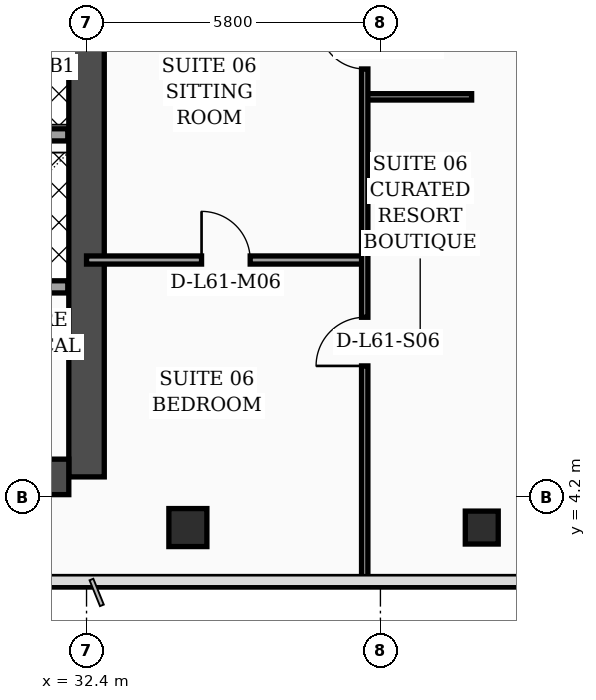
"""IFC4 building model, lengths in metres.
Left out: names, types, materials, properties, quantities, classifications, styles, units other than length and angle.
Written with IfcOpenShell. Run it as: python <this file> out.ifc"""

import sys

from ifc_helpers import new_model, si_unit, direction, frame, frame_2d, origin, origin_2d, place, context, subcontext, project, spatial, rectangle, hollow_rectangle, extrude, element, fill, save


model = new_model("IFC4")
c1 = context("Model", 3, precision=1e-05, world=origin(), true_north=direction((0.0, 1.0)))
c2 = subcontext(c1, "Body", "Model", "MODEL_VIEW")
j1 = project(units=[si_unit("LENGTHUNIT", "METRE"), si_unit("PLANEANGLEUNIT", "RADIAN")], contexts=[c1])
p1 = place(None, origin())
s1 = spatial("IfcSite", under=j1, at=p1, CompositionType="ELEMENT")
p2 = place(p1, origin())
s2 = spatial("IfcBuilding", under=s1, at=p2, CompositionType="ELEMENT")
p3 = place(p2, frame((0.0, 0.0, 247.6)))
s3 = spatial("IfcBuildingStorey", under=s2, at=p3, CompositionType="ELEMENT", Elevation=247.6)
p4 = place(p3, frame((32.4, 4.6, 0.0), z_axis=(0.0, 0.0, 1.0), x_axis=(0.0, 1.0, 0.0)))
e1 = element("IfcWall", 1, at=p4, inside=s3, PredefinedType="SHEAR", context=c2, shape_type="SweptSolid", body=[
    extrude(rectangle(XDim=10.4, YDim=0.7, at=frame_2d((5.2, 0.0))), origin(), (0.0, 0.0, 1.0), 3.56),
])
p5 = place(p3, frame((21.95, 4.6, 0.0), z_axis=(0.0, 0.0, 1.0), x_axis=(1.0, 0.0, 0.0)))
e2 = element("IfcWall", 2, at=p5, inside=s3, PredefinedType="SHEAR", context=c2, shape_type="SweptSolid", body=[
    extrude(rectangle(XDim=10.1, YDim=0.7, at=frame_2d((5.05, 0.0))), origin(), (0.0, 0.0, 1.0), 3.56),
])
p6 = place(p3, frame((34.4, 3.6, 0.0), z_axis=(0.0, 0.0, 1.0), x_axis=(1.0, 0.0, 0.0)))
e3 = element("IfcColumn", 3, at=p6, inside=s3, PredefinedType="COLUMN", context=c2, shape_type="SweptSolid", body=[
    extrude(hollow_rectangle(XDim=0.75, YDim=0.75, WallThickness=0.032, at=origin_2d()), origin(), (0.0, 0.0, 1.0), 3.56),
])
p7 = place(p3, frame((40.2, 3.6, 0.0), z_axis=(0.0, 0.0, 1.0), x_axis=(1.0, 0.0, 0.0)))
e4 = element("IfcColumn", 4, at=p7, inside=s3, PredefinedType="COLUMN", context=c2, shape_type="SweptSolid", body=[
    extrude(hollow_rectangle(XDim=0.65, YDim=0.65, WallThickness=0.028, at=origin_2d()), origin(), (0.0, 0.0, 1.0), 3.56),
])
p8 = place(p3, frame((46.63, 5.505, 0.0), z_axis=(0.0, 0.0, 1.0), x_axis=(-0.300501856448, 0.953781229775, 0.0)))
e5 = element("IfcWall", 5, at=p8, inside=s3, PredefinedType="SOLIDWALL", context=c2, shape_type="SweptSolid", body=[
    extrude(rectangle(XDim=30.814, YDim=0.32, at=frame_2d((15.407, 0.0))), origin(), (0.0, 0.0, 1.0), 3.56),
])
p9 = place(p8, frame((10.199, 0.0, 0.0)))
e6 = element("IfcOpeningElement", 6, at=p9, cuts=e5, PredefinedType="OPENING", context=c2, shape_type="SweptSolid", body=[
    extrude(rectangle(XDim=1.4, YDim=2.25, at=frame_2d((0.7, 1.125))), frame((0.0, 0.17, 0.0), z_axis=(0.0, -1.0, 0.0), x_axis=(1.0, 0.0, 0.0)), (0.0, 0.0, 1.0), 0.34),
])
p10 = place(p8, frame((4.437, 0.0, 0.7)))
e7 = element("IfcOpeningElement", 7, at=p10, cuts=e5, PredefinedType="OPENING", context=c2, shape_type="SweptSolid", body=[
    extrude(rectangle(XDim=1.6, YDim=1.65, at=frame_2d((0.8, 0.825))), frame((0.0, 0.17, 0.0), z_axis=(0.0, -1.0, 0.0), x_axis=(1.0, 0.0, 0.0)), (0.0, 0.0, 1.0), 0.34),
])
p11 = place(p8, frame((18.696, 0.0, 0.7)))
e8 = element("IfcOpeningElement", 8, at=p11, cuts=e5, PredefinedType="OPENING", context=c2, shape_type="SweptSolid", body=[
    extrude(rectangle(XDim=1.6, YDim=1.65, at=frame_2d((0.8, 0.825))), frame((0.0, 0.17, 0.0), z_axis=(0.0, -1.0, 0.0), x_axis=(1.0, 0.0, 0.0)), (0.0, 0.0, 1.0), 0.34),
])
p12 = place(p8, frame((1.6, 0.0, 0.75)))
e9 = element("IfcOpeningElement", 9, at=p12, cuts=e5, PredefinedType="OPENING", context=c2, shape_type="SweptSolid", body=[
    extrude(rectangle(XDim=1.5, YDim=1.6, at=frame_2d((0.75, 0.8))), frame((0.0, 0.17, 0.0), z_axis=(0.0, -1.0, 0.0), x_axis=(1.0, 0.0, 0.0)), (0.0, 0.0, 1.0), 0.34),
])
p13 = place(p8, frame((7.8, 0.0, 0.75)))
e10 = element("IfcOpeningElement", 10, at=p13, cuts=e5, PredefinedType="OPENING", context=c2, shape_type="SweptSolid", body=[
    extrude(rectangle(XDim=1.5, YDim=1.6, at=frame_2d((0.75, 0.8))), frame((0.0, 0.17, 0.0), z_axis=(0.0, -1.0, 0.0), x_axis=(1.0, 0.0, 0.0)), (0.0, 0.0, 1.0), 0.34),
])
p14 = place(p8, frame((14.0, 0.0, 0.75)))
e11 = element("IfcOpeningElement", 11, at=p14, cuts=e5, PredefinedType="OPENING", context=c2, shape_type="SweptSolid", body=[
    extrude(rectangle(XDim=1.5, YDim=1.6, at=frame_2d((0.75, 0.8))), frame((0.0, 0.17, 0.0), z_axis=(0.0, -1.0, 0.0), x_axis=(1.0, 0.0, 0.0)), (0.0, 0.0, 1.0), 0.34),
])
p15 = place(p8, frame((16.55, 0.0, 0.75)))
e12 = element("IfcOpeningElement", 12, at=p15, cuts=e5, PredefinedType="OPENING", context=c2, shape_type="SweptSolid", body=[
    extrude(rectangle(XDim=1.5, YDim=1.6, at=frame_2d((0.75, 0.8))), frame((0.0, 0.17, 0.0), z_axis=(0.0, -1.0, 0.0), x_axis=(1.0, 0.0, 0.0)), (0.0, 0.0, 1.0), 0.34),
])
p16 = place(p8, frame((20.75, 0.0, 0.75)))
e13 = element("IfcOpeningElement", 13, at=p16, cuts=e5, PredefinedType="OPENING", context=c2, shape_type="SweptSolid", body=[
    extrude(rectangle(XDim=1.5, YDim=1.6, at=frame_2d((0.75, 0.8))), frame((0.0, 0.17, 0.0), z_axis=(0.0, -1.0, 0.0), x_axis=(1.0, 0.0, 0.0)), (0.0, 0.0, 1.0), 0.34),
])
p17 = place(p8, frame((23.3, 0.0, 0.75)))
e14 = element("IfcOpeningElement", 14, at=p17, cuts=e5, PredefinedType="OPENING", context=c2, shape_type="SweptSolid", body=[
    extrude(rectangle(XDim=1.5, YDim=1.6, at=frame_2d((0.75, 0.8))), frame((0.0, 0.17, 0.0), z_axis=(0.0, -1.0, 0.0), x_axis=(1.0, 0.0, 0.0)), (0.0, 0.0, 1.0), 0.34),
])
p18 = place(p8, frame((26.4, 0.0, 0.75)))
e15 = element("IfcOpeningElement", 15, at=p18, cuts=e5, PredefinedType="OPENING", context=c2, shape_type="SweptSolid", body=[
    extrude(rectangle(XDim=1.5, YDim=1.6, at=frame_2d((0.75, 0.8))), frame((0.0, 0.17, 0.0), z_axis=(0.0, -1.0, 0.0), x_axis=(1.0, 0.0, 0.0)), (0.0, 0.0, 1.0), 0.34),
])
p19 = place(p3, frame((27.02, 11.35, 0.0), z_axis=(0.0, 0.0, 1.0), x_axis=(1.0, 0.0, 0.0)))
e16 = element("IfcWall", 16, at=p19, inside=s3, PredefinedType="SOLIDWALL", context=c2, shape_type="SweptSolid", body=[
    extrude(rectangle(XDim=5.01, YDim=0.24, at=frame_2d((2.505, 0.0))), origin(), (0.0, 0.0, 1.0), 3.56),
])
p20 = place(p19, frame((0.45, 0.0, 0.0)))
e17 = element("IfcOpeningElement", 17, at=p20, cuts=e16, PredefinedType="OPENING", context=c2, shape_type="SweptSolid", body=[
    extrude(rectangle(XDim=1.3, YDim=2.35, at=frame_2d((0.65, 1.175))), frame((0.0, 0.13, 0.0), z_axis=(0.0, -1.0, 0.0), x_axis=(1.0, 0.0, 0.0)), (0.0, 0.0, 1.0), 0.26),
])
p21 = place(p3, frame((27.02, 8.35, 0.0), z_axis=(0.0, 0.0, 1.0), x_axis=(1.0, 0.0, 0.0)))
e18 = element("IfcWall", 18, at=p21, inside=s3, PredefinedType="SOLIDWALL", context=c2, shape_type="SweptSolid", body=[
    extrude(rectangle(XDim=5.01, YDim=0.24, at=frame_2d((2.505, 0.0))), origin(), (0.0, 0.0, 1.0), 3.56),
])
p22 = place(p3, frame((37.89, 12.1, 0.0), z_axis=(0.0, 0.0, 1.0), x_axis=(1.0, 0.0, 0.0)))
e19 = element("IfcWall", 19, at=p22, inside=s3, PredefinedType="PARTITIONING", context=c2, shape_type="SweptSolid", body=[
    extrude(rectangle(XDim=2.11, YDim=0.125, at=frame_2d((1.055, 0.0))), origin(), (0.0, 0.0, 1.0), 3.56),
])
p23 = place(p3, frame((32.4, 8.88, 0.0), z_axis=(0.0, 0.0, 1.0), x_axis=(1.0, 0.0, 0.0)))
e20 = element("IfcWall", 20, at=p23, inside=s3, PredefinedType="PARTITIONING", context=c2, shape_type="SweptSolid", body=[
    extrude(rectangle(XDim=5.49, YDim=0.16, at=frame_2d((2.745, 0.0))), origin(), (0.0, 0.0, 1.0), 2.99),
])
p24 = place(p23, frame((2.27, 0.0, 0.0)))
e21 = element("IfcOpeningElement", 21, at=p24, cuts=e20, PredefinedType="OPENING", context=c2, shape_type="SweptSolid", body=[
    extrude(rectangle(XDim=0.96, YDim=2.2, at=frame_2d((0.48, 1.1))), frame((0.0, 0.09, 0.0), z_axis=(0.0, -1.0, 0.0), x_axis=(1.0, 0.0, 0.0)), (0.0, 0.0, 1.0), 0.18),
])
p25 = place(p3, frame((37.89, 2.44, 0.0), z_axis=(0.0, 0.0, 1.0), x_axis=(0.0, 1.0, 0.0)))
e22 = element("IfcWall", 22, at=p25, inside=s3, PredefinedType="PARTITIONING", context=c2, shape_type="SweptSolid", body=[
    extrude(rectangle(XDim=12.71, YDim=0.125, at=frame_2d((6.355, 0.0))), origin(), (0.0, 0.0, 1.0), 2.99),
])
p26 = place(p25, frame((4.35, 0.0, 0.0)))
e23 = element("IfcOpeningElement", 23, at=p26, cuts=e22, PredefinedType="OPENING", context=c2, shape_type="SweptSolid", body=[
    extrude(rectangle(XDim=0.96, YDim=2.2, at=frame_2d((0.48, 1.1))), frame((0.0, 0.073, 0.0), z_axis=(0.0, -1.0, 0.0), x_axis=(1.0, 0.0, 0.0)), (0.0, 0.0, 1.0), 0.145),
])
p27 = place(p25, frame((10.21, 0.0, 0.0)))
e24 = element("IfcOpeningElement", 24, at=p27, cuts=e22, PredefinedType="OPENING", context=c2, shape_type="SweptSolid", body=[
    extrude(rectangle(XDim=0.9, YDim=2.15, at=frame_2d((0.45, 1.075))), frame((0.0, 0.073, 0.0), z_axis=(0.0, -1.0, 0.0), x_axis=(1.0, 0.0, 0.0)), (0.0, 0.0, 1.0), 0.145),
])
p28 = place(p24, origin())
e25 = element("IfcDoor", 25, at=p28, inside=s3, OperationType="SINGLE_SWING_LEFT", PredefinedType="DOOR", context=c2, shape_type="SweptSolid", body=[
    extrude(rectangle(XDim=0.96, YDim=2.2, at=frame_2d((0.48, 1.1))), frame((0.0, 0.025, 0.0), z_axis=(0.0, -1.0, 0.0), x_axis=(1.0, 0.0, 0.0)), (0.0, 0.0, 1.0), 0.05),
])
fill(e21, e25)
p29 = place(p26, origin())
e26 = element("IfcDoor", 26, at=p29, inside=s3, OperationType="SINGLE_SWING_LEFT", PredefinedType="DOOR", context=c2, shape_type="SweptSolid", body=[
    extrude(rectangle(XDim=0.96, YDim=2.2, at=frame_2d((0.48, 1.1))), frame((0.0, 0.025, 0.0), z_axis=(0.0, -1.0, 0.0), x_axis=(1.0, 0.0, 0.0)), (0.0, 0.0, 1.0), 0.05),
])
fill(e23, e26)
p30 = place(p27, origin())
e27 = element("IfcDoor", 27, at=p30, inside=s3, OperationType="SINGLE_SWING_RIGHT", PredefinedType="DOOR", context=c2, shape_type="SweptSolid", body=[
    extrude(rectangle(XDim=0.9, YDim=2.15, at=frame_2d((0.45, 1.075))), frame((0.0, 0.025, 0.0), z_axis=(0.0, -1.0, 0.0), x_axis=(1.0, 0.0, 0.0)), (0.0, 0.0, 1.0), 0.05),
])
fill(e24, e27)
save(model, sys.argv[1])
